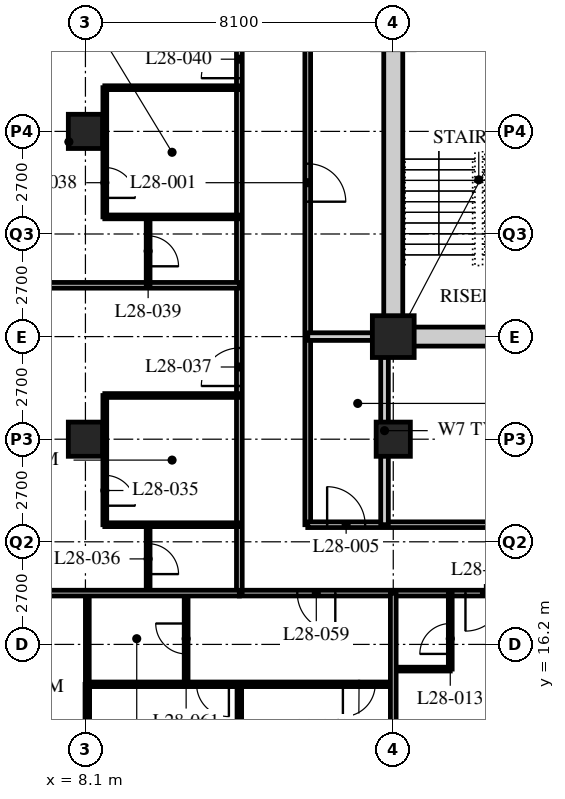
"""IFC4 building model, lengths in metres.
Left out: names, types, materials, properties, quantities, classifications, styles, units other than length and angle.
Written with IfcOpenShell. Run it as: python <this file> out.ifc"""

import sys

from ifc_helpers import new_model, si_unit, direction, frame, frame_2d, origin, origin_2d, place, context, subcontext, project, spatial, rectangle, hollow_rectangle, extrude, element, fill, save


model = new_model("IFC4")
c1 = context("Model", 3, precision=1e-05, world=origin(), true_north=direction((0.0, 1.0)))
c2 = subcontext(c1, "Body", "Model", "MODEL_VIEW")
j1 = project(units=[si_unit("LENGTHUNIT", "METRE"), si_unit("PLANEANGLEUNIT", "RADIAN")], contexts=[c1])
p1 = place(None, origin())
s1 = spatial("IfcSite", under=j1, at=p1, CompositionType="ELEMENT")
p2 = place(p1, origin())
s2 = spatial("IfcBuilding", under=s1, at=p2, CompositionType="ELEMENT")
p3 = place(p2, frame((0.0, 0.0, 113.6)))
s3 = spatial("IfcBuildingStorey", under=s2, at=p3, CompositionType="ELEMENT", Elevation=113.6)
for number, where, z_axis, x_axis in (
    (1, (8.1, 21.6, 0.0), (0.0, 0.0, 1.0), (1.0, 0.0, 0.0)),
    (2, (8.1, 29.7, 0.0), (0.0, 0.0, 1.0), (1.0, 0.0, 0.0)),
    (3, (16.2, 21.6, 0.0), (0.0, 0.0, 1.0), (1.0, 0.0, 0.0)),
):
    element("IfcColumn", number, at=place(p3, frame(where, z_axis=z_axis, x_axis=x_axis)), inside=s3, PredefinedType="COLUMN", context=c2, shape_type="SweptSolid", body=[
        extrude(hollow_rectangle(XDim=0.9, YDim=0.9, WallThickness=0.09, at=origin_2d()), origin(), (0.0, 0.0, 1.0), 3.4),
    ])
p4 = place(p3, frame((16.2, 24.3, 0.0), z_axis=(0.0, 0.0, 1.0), x_axis=(1.0, 0.0, 0.0)))
e4 = element("IfcColumn", 4, at=p4, inside=s3, PredefinedType="COLUMN", context=c2, shape_type="SweptSolid", body=[
    extrude(hollow_rectangle(XDim=1.1, YDim=1.1, WallThickness=0.1, at=origin_2d()), origin(), (0.0, 0.0, 1.0), 3.4),
])
p5 = place(p3, frame((12.15, 17.55, 0.0), z_axis=(0.0, 0.0, 1.0), x_axis=(1.0, 0.0, 0.0)))
e5 = element("IfcWall", 5, at=p5, inside=s3, PredefinedType="PARTITIONING", context=c2, shape_type="SweptSolid", body=[
    extrude(rectangle(XDim=32.4, YDim=0.15, at=frame_2d((16.2, 0.0))), origin(), (0.0, 0.0, 1.0), 3.19),
])
p6 = place(p5, frame((5.95, 0.0, 0.0)))
e6 = element("IfcOpeningElement", 6, at=p6, cuts=e5, PredefinedType="OPENING", context=c2, shape_type="SweptSolid", body=[
    extrude(rectangle(XDim=1.0, YDim=2.1, at=frame_2d((0.5, 1.05))), frame((0.0, 0.085, 0.0), z_axis=(0.0, -1.0, 0.0), x_axis=(1.0, 0.0, 0.0)), (0.0, 0.0, 1.0), 0.17),
])
p7 = place(p5, frame((17.725, 0.0, 0.0)))
e7 = element("IfcOpeningElement", 7, at=p7, cuts=e5, PredefinedType="OPENING", context=c2, shape_type="SweptSolid", body=[
    extrude(rectangle(XDim=1.0, YDim=2.1, at=frame_2d((0.5, 1.05))), frame((0.0, 0.085, 0.0), z_axis=(0.0, -1.0, 0.0), x_axis=(1.0, 0.0, 0.0)), (0.0, 0.0, 1.0), 0.17),
])
p8 = place(p5, frame((26.75, 0.0, 0.0)))
e8 = element("IfcOpeningElement", 8, at=p8, cuts=e5, PredefinedType="OPENING", context=c2, shape_type="SweptSolid", body=[
    extrude(rectangle(XDim=1.0, YDim=2.1, at=frame_2d((0.5, 1.05))), frame((0.0, 0.085, 0.0), z_axis=(0.0, -1.0, 0.0), x_axis=(1.0, 0.0, 0.0)), (0.0, 0.0, 1.0), 0.17),
])
p9 = place(p5, frame((1.525, 0.0, 0.0)))
e9 = element("IfcOpeningElement", 9, at=p9, cuts=e5, PredefinedType="OPENING", context=c2, shape_type="SweptSolid", body=[
    extrude(rectangle(XDim=1.0, YDim=2.1, at=frame_2d((0.5, 1.05))), frame((0.0, 0.085, 0.0), z_axis=(0.0, -1.0, 0.0), x_axis=(1.0, 0.0, 0.0)), (0.0, 0.0, 1.0), 0.17),
])
p10 = place(p5, frame((29.875, 0.0, 0.0)))
e10 = element("IfcOpeningElement", 10, at=p10, cuts=e5, PredefinedType="OPENING", context=c2, shape_type="SweptSolid", body=[
    extrude(rectangle(XDim=1.0, YDim=2.1, at=frame_2d((0.5, 1.05))), frame((0.0, 0.085, 0.0), z_axis=(0.0, -1.0, 0.0), x_axis=(1.0, 0.0, 0.0)), (0.0, 0.0, 1.0), 0.17),
])
p11 = place(p3, frame((12.15, 17.55, 0.0), z_axis=(0.0, 0.0, 1.0), x_axis=(0.0, 1.0, 0.0)))
e11 = element("IfcWall", 11, at=p11, inside=s3, PredefinedType="PARTITIONING", context=c2, shape_type="SweptSolid", body=[
    extrude(rectangle(XDim=28.35, YDim=0.15, at=frame_2d((14.175, 0.0))), origin(), (0.0, 0.0, 1.0), 3.19),
])
p12 = place(p11, frame((5.45, 0.0, 0.0)))
e12 = element("IfcOpeningElement", 12, at=p12, cuts=e11, PredefinedType="OPENING", context=c2, shape_type="SweptSolid", body=[
    extrude(rectangle(XDim=1.0, YDim=2.1, at=frame_2d((0.5, 1.05))), frame((0.0, 0.085, 0.0), z_axis=(0.0, -1.0, 0.0), x_axis=(1.0, 0.0, 0.0)), (0.0, 0.0, 1.0), 0.17),
])
p13 = place(p11, frame((13.55, 0.0, 0.0)))
e13 = element("IfcOpeningElement", 13, at=p13, cuts=e11, PredefinedType="OPENING", context=c2, shape_type="SweptSolid", body=[
    extrude(rectangle(XDim=1.0, YDim=2.1, at=frame_2d((0.5, 1.05))), frame((0.0, 0.085, 0.0), z_axis=(0.0, -1.0, 0.0), x_axis=(1.0, 0.0, 0.0)), (0.0, 0.0, 1.0), 0.17),
])
p14 = place(p11, frame((21.65, 0.0, 0.0)))
e14 = element("IfcOpeningElement", 14, at=p14, cuts=e11, PredefinedType="OPENING", context=c2, shape_type="SweptSolid", body=[
    extrude(rectangle(XDim=1.0, YDim=2.1, at=frame_2d((0.5, 1.05))), frame((0.0, 0.085, 0.0), z_axis=(0.0, -1.0, 0.0), x_axis=(1.0, 0.0, 0.0)), (0.0, 0.0, 1.0), 0.17),
])
p15 = place(p11, frame((26.75, 0.0, 0.0)))
e15 = element("IfcOpeningElement", 15, at=p15, cuts=e11, PredefinedType="OPENING", context=c2, shape_type="SweptSolid", body=[
    extrude(rectangle(XDim=1.0, YDim=2.1, at=frame_2d((0.5, 1.05))), frame((0.0, 0.085, 0.0), z_axis=(0.0, -1.0, 0.0), x_axis=(1.0, 0.0, 0.0)), (0.0, 0.0, 1.0), 0.17),
])
p16 = place(p3, frame((13.95, 44.1, 0.0), z_axis=(0.0, 0.0, 1.0), x_axis=(0.0, -1.0, 0.0)))
e16 = element("IfcWall", 16, at=p16, inside=s3, PredefinedType="PARTITIONING", context=c2, shape_type="SweptSolid", body=[
    extrude(rectangle(XDim=24.75, YDim=0.15, at=frame_2d((12.375, 0.0))), origin(), (0.0, 0.0, 1.0), 3.19),
])
p17 = place(p16, frame((15.25, 0.0, 0.0)))
e17 = element("IfcOpeningElement", 17, at=p17, cuts=e16, PredefinedType="OPENING", context=c2, shape_type="SweptSolid", body=[
    extrude(rectangle(XDim=1.0, YDim=2.1, at=frame_2d((0.5, 1.05))), frame((0.0, 0.085, 0.0), z_axis=(0.0, -1.0, 0.0), x_axis=(1.0, 0.0, 0.0)), (0.0, 0.0, 1.0), 0.17),
])
p18 = place(p16, frame((7.15, 0.0, 0.0)))
e18 = element("IfcOpeningElement", 18, at=p18, cuts=e16, PredefinedType="OPENING", context=c2, shape_type="SweptSolid", body=[
    extrude(rectangle(XDim=1.0, YDim=2.1, at=frame_2d((0.5, 1.05))), frame((0.0, 0.085, 0.0), z_axis=(0.0, -1.0, 0.0), x_axis=(1.0, 0.0, 0.0)), (0.0, 0.0, 1.0), 0.17),
])
p19 = place(p3, frame((13.95, 19.35, 0.0), z_axis=(0.0, 0.0, 1.0), x_axis=(1.0, 0.0, 0.0)))
e19 = element("IfcWall", 19, at=p19, inside=s3, PredefinedType="PARTITIONING", context=c2, shape_type="SweptSolid", body=[
    extrude(rectangle(XDim=13.19, YDim=0.15, at=frame_2d((6.595, 0.0))), origin(), (0.0, 0.0, 1.0), 3.19),
])
p20 = place(p19, frame((0.51, 0.0, 0.0)))
e20 = element("IfcOpeningElement", 20, at=p20, cuts=e19, PredefinedType="OPENING", context=c2, shape_type="SweptSolid", body=[
    extrude(rectangle(XDim=1.0, YDim=2.1, at=frame_2d((0.5, 1.05))), frame((0.0, 0.085, 0.0), z_axis=(0.0, -1.0, 0.0), x_axis=(1.0, 0.0, 0.0)), (0.0, 0.0, 1.0), 0.17),
])
p21 = place(p19, frame((7.11, 0.0, 0.0)))
e21 = element("IfcOpeningElement", 21, at=p21, cuts=e19, PredefinedType="OPENING", context=c2, shape_type="SweptSolid", body=[
    extrude(rectangle(XDim=1.0, YDim=2.1, at=frame_2d((0.5, 1.05))), frame((0.0, 0.085, 0.0), z_axis=(0.0, -1.0, 0.0), x_axis=(1.0, 0.0, 0.0)), (0.0, 0.0, 1.0), 0.17),
])
p22 = place(p3, frame((15.97, 19.35, 0.0), z_axis=(0.0, 0.0, 1.0), x_axis=(0.0, 1.0, 0.0)))
e22 = element("IfcWall", 22, at=p22, inside=s3, PredefinedType="SOLIDWALL", context=c2, shape_type="SweptSolid", body=[
    extrude(rectangle(XDim=4.95, YDim=0.2, at=frame_2d((2.475, 0.0))), origin(), (0.0, 0.0, 1.0), 2.49),
])
p23 = place(p3, frame((13.95, 24.3, 0.0), z_axis=(0.0, 0.0, 1.0), x_axis=(1.0, 0.0, 0.0)))
e23 = element("IfcWall", 23, at=p23, inside=s3, PredefinedType="SOLIDWALL", context=c2, shape_type="SweptSolid", body=[
    extrude(rectangle(XDim=2.25, YDim=0.2, at=frame_2d((1.125, 0.0))), origin(), (0.0, 0.0, 1.0), 3.19),
])
p24 = place(p3, frame((16.2, 15.55, 0.0), z_axis=(0.0, 0.0, 1.0), x_axis=(1.0, 0.0, 0.0)))
e24 = element("IfcWall", 24, at=p24, inside=s3, PredefinedType="PARTITIONING", context=c2, shape_type="SweptSolid", body=[
    extrude(rectangle(XDim=1.5, YDim=0.1, at=frame_2d((0.75, 0.0))), origin(), (0.0, 0.0, 1.0), 3.19),
])
p25 = place(p3, frame((17.7, 17.55, 0.0), z_axis=(0.0, 0.0, 1.0), x_axis=(0.0, -1.0, 0.0)))
e25 = element("IfcWall", 25, at=p25, inside=s3, PredefinedType="PARTITIONING", context=c2, shape_type="SweptSolid", body=[
    extrude(rectangle(XDim=2.0, YDim=0.1, at=frame_2d((1.0, 0.0))), origin(), (0.0, 0.0, 1.0), 3.19),
])
p26 = place(p25, frame((0.8, 0.0, 0.0)))
e26 = element("IfcOpeningElement", 26, at=p26, cuts=e25, PredefinedType="OPENING", context=c2, shape_type="SweptSolid", body=[
    extrude(rectangle(XDim=0.8, YDim=2.1, at=frame_2d((0.4, 1.05))), frame((0.0, 0.06, 0.0), z_axis=(0.0, -1.0, 0.0), x_axis=(1.0, 0.0, 0.0)), (0.0, 0.0, 1.0), 0.12),
])
p27 = place(p3, frame((8.61, 19.35, 0.0), z_axis=(0.0, 0.0, 1.0), x_axis=(0.0, 1.0, 0.0)))
e27 = element("IfcWall", 27, at=p27, inside=s3, PredefinedType="PARTITIONING", context=c2, shape_type="SweptSolid", body=[
    extrude(rectangle(XDim=3.4, YDim=0.1, at=frame_2d((1.7, 0.0))), origin(), (0.0, 0.0, 1.0), 3.19),
])
p28 = place(p27, frame((0.5, 0.0, 0.0)))
e28 = element("IfcOpeningElement", 28, at=p28, cuts=e27, PredefinedType="OPENING", context=c2, shape_type="SweptSolid", body=[
    extrude(rectangle(XDim=0.8, YDim=2.1, at=frame_2d((0.4, 1.05))), frame((0.0, 0.06, 0.0), z_axis=(0.0, -1.0, 0.0), x_axis=(1.0, 0.0, 0.0)), (0.0, 0.0, 1.0), 0.12),
])
p29 = place(p3, frame((9.75, 17.55, 0.0), z_axis=(0.0, 0.0, 1.0), x_axis=(0.0, 1.0, 0.0)))
e29 = element("IfcWall", 29, at=p29, inside=s3, PredefinedType="PARTITIONING", context=c2, shape_type="SweptSolid", body=[
    extrude(rectangle(XDim=1.8, YDim=0.1, at=frame_2d((0.9, 0.0))), origin(), (0.0, 0.0, 1.0), 3.19),
])
p30 = place(p29, frame((0.5, 0.0, 0.0)))
e30 = element("IfcOpeningElement", 30, at=p30, cuts=e29, PredefinedType="OPENING", context=c2, shape_type="SweptSolid", body=[
    extrude(rectangle(XDim=0.8, YDim=2.1, at=frame_2d((0.4, 1.05))), frame((0.0, 0.06, 0.0), z_axis=(0.0, -1.0, 0.0), x_axis=(1.0, 0.0, 0.0)), (0.0, 0.0, 1.0), 0.12),
])
for number, where, z_axis, x_axis in (
    (31, (12.15, 19.35, 0.0), (0.0, 0.0, 1.0), (-1.0, 0.0, 0.0)),
    (32, (12.15, 22.75, 0.0), (0.0, 0.0, 1.0), (-1.0, 0.0, 0.0)),
):
    element("IfcWall", number, at=place(p3, frame(where, z_axis=z_axis, x_axis=x_axis)), inside=s3, PredefinedType="PARTITIONING", context=c2, shape_type="SweptSolid", body=[
        extrude(rectangle(XDim=3.54, YDim=0.1, at=frame_2d((1.77, 0.0))), origin(), (0.0, 0.0, 1.0), 3.19),
    ])
p31 = place(p3, frame((12.15, 25.65, 0.0), z_axis=(0.0, 0.0, 1.0), x_axis=(-1.0, 0.0, 0.0)))
e33 = element("IfcWall", 33, at=p31, inside=s3, PredefinedType="PARTITIONING", context=c2, shape_type="SweptSolid", body=[
    extrude(rectangle(XDim=11.85, YDim=0.15, at=frame_2d((5.925, 0.0))), origin(), (0.0, 0.0, 1.0), 3.19),
])
p32 = place(p3, frame((8.61, 27.45, 0.0), z_axis=(0.0, 0.0, 1.0), x_axis=(0.0, 1.0, 0.0)))
e34 = element("IfcWall", 34, at=p32, inside=s3, PredefinedType="PARTITIONING", context=c2, shape_type="SweptSolid", body=[
    extrude(rectangle(XDim=3.4, YDim=0.1, at=frame_2d((1.7, 0.0))), origin(), (0.0, 0.0, 1.0), 3.19),
])
p33 = place(p32, frame((0.5, 0.0, 0.0)))
e35 = element("IfcOpeningElement", 35, at=p33, cuts=e34, PredefinedType="OPENING", context=c2, shape_type="SweptSolid", body=[
    extrude(rectangle(XDim=0.8, YDim=2.1, at=frame_2d((0.4, 1.05))), frame((0.0, 0.06, 0.0), z_axis=(0.0, -1.0, 0.0), x_axis=(1.0, 0.0, 0.0)), (0.0, 0.0, 1.0), 0.12),
])
p34 = place(p3, frame((9.75, 25.65, 0.0), z_axis=(0.0, 0.0, 1.0), x_axis=(0.0, 1.0, 0.0)))
e36 = element("IfcWall", 36, at=p34, inside=s3, PredefinedType="PARTITIONING", context=c2, shape_type="SweptSolid", body=[
    extrude(rectangle(XDim=1.8, YDim=0.1, at=frame_2d((0.9, 0.0))), origin(), (0.0, 0.0, 1.0), 3.19),
])
p35 = place(p34, frame((0.5, 0.0, 0.0)))
e37 = element("IfcOpeningElement", 37, at=p35, cuts=e36, PredefinedType="OPENING", context=c2, shape_type="SweptSolid", body=[
    extrude(rectangle(XDim=0.8, YDim=2.1, at=frame_2d((0.4, 1.05))), frame((0.0, 0.06, 0.0), z_axis=(0.0, -1.0, 0.0), x_axis=(1.0, 0.0, 0.0)), (0.0, 0.0, 1.0), 0.12),
])
for number, where, z_axis, x_axis in (
    (38, (12.15, 27.45, 0.0), (0.0, 0.0, 1.0), (-1.0, 0.0, 0.0)),
    (39, (12.15, 30.85, 0.0), (0.0, 0.0, 1.0), (-1.0, 0.0, 0.0)),
):
    element("IfcWall", number, at=place(p3, frame(where, z_axis=z_axis, x_axis=x_axis)), inside=s3, PredefinedType="PARTITIONING", context=c2, shape_type="SweptSolid", body=[
        extrude(rectangle(XDim=3.54, YDim=0.1, at=frame_2d((1.77, 0.0))), origin(), (0.0, 0.0, 1.0), 3.19),
    ])
p36 = place(p3, frame((10.75, 17.55, 0.0), z_axis=(0.0, 0.0, 1.0), x_axis=(0.0, -1.0, 0.0)))
e40 = element("IfcWall", 40, at=p36, inside=s3, PredefinedType="PARTITIONING", context=c2, shape_type="SweptSolid", body=[
    extrude(rectangle(XDim=2.4, YDim=0.1, at=frame_2d((1.2, 0.0))), origin(), (0.0, 0.0, 1.0), 3.19),
])
p37 = place(p36, frame((0.8, 0.0, 0.0)))
e41 = element("IfcOpeningElement", 41, at=p37, cuts=e40, PredefinedType="OPENING", context=c2, shape_type="SweptSolid", body=[
    extrude(rectangle(XDim=0.8, YDim=2.1, at=frame_2d((0.4, 1.05))), frame((0.0, 0.06, 0.0), z_axis=(0.0, -1.0, 0.0), x_axis=(1.0, 0.0, 0.0)), (0.0, 0.0, 1.0), 0.12),
])
p38 = place(p3, frame((8.15, 17.55, 0.0), z_axis=(0.0, 0.0, 1.0), x_axis=(0.0, -1.0, 0.0)))
e42 = element("IfcWall", 42, at=p38, inside=s3, PredefinedType="PARTITIONING", context=c2, shape_type="SweptSolid", body=[
    extrude(rectangle(XDim=2.4, YDim=0.1, at=frame_2d((1.2, 0.0))), origin(), (0.0, 0.0, 1.0), 2.578),
])
p39 = place(p3, frame((8.15, 15.15, 0.0), z_axis=(0.0, 0.0, 1.0), x_axis=(1.0, 0.0, 0.0)))
e43 = element("IfcWall", 43, at=p39, inside=s3, PredefinedType="PARTITIONING", context=c2, shape_type="SweptSolid", body=[
    extrude(rectangle(XDim=8.05, YDim=0.12, at=frame_2d((4.025, 0.0))), origin(), (0.0, 0.0, 1.0), 3.19),
])
p40 = place(p39, frame((6.725, 0.0, 0.0)))
e44 = element("IfcOpeningElement", 44, at=p40, cuts=e43, PredefinedType="OPENING", context=c2, shape_type="SweptSolid", body=[
    extrude(rectangle(XDim=0.85, YDim=2.1, at=frame_2d((0.425, 1.05))), frame((0.0, 0.07, 0.0), z_axis=(0.0, -1.0, 0.0), x_axis=(1.0, 0.0, 0.0)), (0.0, 0.0, 1.0), 0.14),
])
p41 = place(p39, frame((2.875, 0.0, 0.0)))
e45 = element("IfcOpeningElement", 45, at=p41, cuts=e43, PredefinedType="OPENING", context=c2, shape_type="SweptSolid", body=[
    extrude(rectangle(XDim=0.85, YDim=2.1, at=frame_2d((0.425, 1.05))), frame((0.0, 0.07, 0.0), z_axis=(0.0, -1.0, 0.0), x_axis=(1.0, 0.0, 0.0)), (0.0, 0.0, 1.0), 0.14),
])
p42 = place(p3, frame((12.15, 15.15, 0.0), z_axis=(0.0, 0.0, 1.0), x_axis=(0.0, -1.0, 0.0)))
e46 = element("IfcWall", 46, at=p42, inside=s3, PredefinedType="PARTITIONING", context=c2, shape_type="SweptSolid", body=[
    extrude(rectangle(XDim=9.45, YDim=0.12, at=frame_2d((4.725, 0.0))), origin(), (0.0, 0.0, 1.0), 3.19),
])
p43 = place(p3, frame((0.3, 17.55, 0.0), z_axis=(0.0, 0.0, 1.0), x_axis=(1.0, 0.0, 0.0)))
e47 = element("IfcWall", 47, at=p43, inside=s3, PredefinedType="PARTITIONING", context=c2, shape_type="SweptSolid", body=[
    extrude(rectangle(XDim=11.85, YDim=0.15, at=frame_2d((5.925, 0.0))), origin(), (0.0, 0.0, 1.0), 3.19),
])
p44 = place(p3, frame((16.2, 17.55, 0.0), z_axis=(0.0, 0.0, 1.0), x_axis=(0.0, -1.0, 0.0)))
e48 = element("IfcWall", 48, at=p44, inside=s3, PredefinedType="PARTITIONING", context=c2, shape_type="SweptSolid", body=[
    extrude(rectangle(XDim=11.85, YDim=0.15, at=frame_2d((5.925, 0.0))), origin(), (0.0, 0.0, 1.0), 2.578),
])
p45 = place(p3, frame((8.15, 15.15, 0.0), z_axis=(0.0, 0.0, 1.0), x_axis=(0.0, -1.0, 0.0)))
e49 = element("IfcWall", 49, at=p45, inside=s3, PredefinedType="PARTITIONING", context=c2, shape_type="SweptSolid", body=[
    extrude(rectangle(XDim=1.2, YDim=0.12, at=frame_2d((0.6, 0.0))), origin(), (0.0, 0.0, 1.0), 2.578),
])
p46 = place(p3, frame((15.95, 24.3, 0.0), z_axis=(0.0, 0.0, 1.0), x_axis=(1.0, 0.0, 0.0)))
e50 = element("IfcWall", 50, at=p46, inside=s3, PredefinedType="SOLIDWALL", context=c2, shape_type="SweptSolid", body=[
    extrude(rectangle(XDim=24.8, YDim=0.5, at=frame_2d((12.4, 0.0))), origin(), (0.0, 0.0, 1.0), 2.54),
])
p47 = place(p46, frame((11.5, 0.0, 0.0)))
e51 = element("IfcOpeningElement", 51, at=p47, cuts=e50, PredefinedType="OPENING", context=c2, shape_type="SweptSolid", body=[
    extrude(rectangle(XDim=1.8, YDim=2.4, at=frame_2d((0.9, 1.2))), frame((0.0, 0.26, 0.0), z_axis=(0.0, -1.0, 0.0), x_axis=(1.0, 0.0, 0.0)), (0.0, 0.0, 1.0), 0.52),
])
p48 = place(p3, frame((16.2, 24.55, 0.0), z_axis=(0.0, 0.0, 1.0), x_axis=(0.0, 1.0, 0.0)))
e52 = element("IfcWall", 52, at=p48, inside=s3, PredefinedType="SOLIDWALL", context=c2, shape_type="SweptSolid", body=[
    extrude(rectangle(XDim=15.7, YDim=0.5, at=frame_2d((7.85, 0.0))), origin(), (0.0, 0.0, 1.0), 2.578),
])
p49 = place(p17, origin())
e53 = element("IfcDoor", 53, at=p49, inside=s3, OperationType="SINGLE_SWING_RIGHT", PredefinedType="DOOR", context=c2, shape_type="SweptSolid", body=[
    extrude(rectangle(XDim=1.0, YDim=2.1, at=frame_2d((0.5, 1.05))), frame((0.0, 0.025, 0.0), z_axis=(0.0, -1.0, 0.0), x_axis=(1.0, 0.0, 0.0)), (0.0, 0.0, 1.0), 0.05),
])
fill(e17, e53)
p50 = place(p20, origin())
e54 = element("IfcDoor", 54, at=p50, inside=s3, OperationType="SINGLE_SWING_LEFT", PredefinedType="DOOR", context=c2, shape_type="SweptSolid", body=[
    extrude(rectangle(XDim=1.0, YDim=2.1, at=frame_2d((0.5, 1.05))), frame((0.0, 0.025, 0.0), z_axis=(0.0, -1.0, 0.0), x_axis=(1.0, 0.0, 0.0)), (0.0, 0.0, 1.0), 0.05),
])
fill(e20, e54)
p51 = place(p26, origin())
e55 = element("IfcDoor", 55, at=p51, inside=s3, OperationType="SINGLE_SWING_LEFT", PredefinedType="DOOR", context=c2, shape_type="SweptSolid", body=[
    extrude(rectangle(XDim=0.8, YDim=2.1, at=frame_2d((0.4, 1.05))), frame((0.0, 0.025, 0.0), z_axis=(0.0, -1.0, 0.0), x_axis=(1.0, 0.0, 0.0)), (0.0, 0.0, 1.0), 0.05),
])
fill(e26, e55)
p52 = place(p6, origin())
e56 = element("IfcDoor", 56, at=p52, inside=s3, OperationType="SINGLE_SWING_RIGHT", PredefinedType="DOOR", context=c2, shape_type="SweptSolid", body=[
    extrude(rectangle(XDim=1.0, YDim=2.1, at=frame_2d((0.5, 1.05))), frame((0.0, 0.025, 0.0), z_axis=(0.0, -1.0, 0.0), x_axis=(1.0, 0.0, 0.0)), (0.0, 0.0, 1.0), 0.05),
])
fill(e6, e56)
p53 = place(p28, origin())
e57 = element("IfcDoor", 57, at=p53, inside=s3, OperationType="SINGLE_SWING_RIGHT", PredefinedType="DOOR", context=c2, shape_type="SweptSolid", body=[
    extrude(rectangle(XDim=0.8, YDim=2.1, at=frame_2d((0.4, 1.05))), frame((0.0, 0.025, 0.0), z_axis=(0.0, -1.0, 0.0), x_axis=(1.0, 0.0, 0.0)), (0.0, 0.0, 1.0), 0.05),
])
fill(e28, e57)
p54 = place(p30, origin())
e58 = element("IfcDoor", 58, at=p54, inside=s3, OperationType="SINGLE_SWING_RIGHT", PredefinedType="DOOR", context=c2, shape_type="SweptSolid", body=[
    extrude(rectangle(XDim=0.8, YDim=2.1, at=frame_2d((0.4, 1.05))), frame((0.0, 0.025, 0.0), z_axis=(0.0, -1.0, 0.0), x_axis=(1.0, 0.0, 0.0)), (0.0, 0.0, 1.0), 0.05),
])
fill(e30, e58)
p55 = place(p12, origin())
e59 = element("IfcDoor", 59, at=p55, inside=s3, OperationType="SINGLE_SWING_LEFT", PredefinedType="DOOR", context=c2, shape_type="SweptSolid", body=[
    extrude(rectangle(XDim=1.0, YDim=2.1, at=frame_2d((0.5, 1.05))), frame((0.0, 0.025, 0.0), z_axis=(0.0, -1.0, 0.0), x_axis=(1.0, 0.0, 0.0)), (0.0, 0.0, 1.0), 0.05),
])
fill(e12, e59)
p56 = place(p33, origin())
e60 = element("IfcDoor", 60, at=p56, inside=s3, OperationType="SINGLE_SWING_RIGHT", PredefinedType="DOOR", context=c2, shape_type="SweptSolid", body=[
    extrude(rectangle(XDim=0.8, YDim=2.1, at=frame_2d((0.4, 1.05))), frame((0.0, 0.025, 0.0), z_axis=(0.0, -1.0, 0.0), x_axis=(1.0, 0.0, 0.0)), (0.0, 0.0, 1.0), 0.05),
])
fill(e35, e60)
p57 = place(p35, origin())
e61 = element("IfcDoor", 61, at=p57, inside=s3, OperationType="SINGLE_SWING_RIGHT", PredefinedType="DOOR", context=c2, shape_type="SweptSolid", body=[
    extrude(rectangle(XDim=0.8, YDim=2.1, at=frame_2d((0.4, 1.05))), frame((0.0, 0.025, 0.0), z_axis=(0.0, -1.0, 0.0), x_axis=(1.0, 0.0, 0.0)), (0.0, 0.0, 1.0), 0.05),
])
fill(e37, e61)
p58 = place(p13, origin())
e62 = element("IfcDoor", 62, at=p58, inside=s3, OperationType="SINGLE_SWING_LEFT", PredefinedType="DOOR", context=c2, shape_type="SweptSolid", body=[
    extrude(rectangle(XDim=1.0, YDim=2.1, at=frame_2d((0.5, 1.05))), frame((0.0, 0.025, 0.0), z_axis=(0.0, -1.0, 0.0), x_axis=(1.0, 0.0, 0.0)), (0.0, 0.0, 1.0), 0.05),
])
fill(e13, e62)
p59 = place(p9, origin())
e63 = element("IfcDoor", 63, at=p59, inside=s3, OperationType="SINGLE_SWING_LEFT", PredefinedType="DOOR", context=c2, shape_type="SweptSolid", body=[
    extrude(rectangle(XDim=1.0, YDim=2.1, at=frame_2d((0.5, 1.05))), frame((0.0, 0.025, 0.0), z_axis=(0.0, -1.0, 0.0), x_axis=(1.0, 0.0, 0.0)), (0.0, 0.0, 1.0), 0.05),
])
fill(e9, e63)
p60 = place(p40, origin())
e64 = element("IfcDoor", 64, at=p60, inside=s3, OperationType="SINGLE_SWING_RIGHT", PredefinedType="DOOR", context=c2, shape_type="SweptSolid", body=[
    extrude(rectangle(XDim=0.85, YDim=2.1, at=frame_2d((0.425, 1.05))), frame((0.0, 0.025, 0.0), z_axis=(0.0, -1.0, 0.0), x_axis=(1.0, 0.0, 0.0)), (0.0, 0.0, 1.0), 0.05),
])
fill(e44, e64)
p61 = place(p37, origin())
e65 = element("IfcDoor", 65, at=p61, inside=s3, OperationType="SINGLE_SWING_RIGHT", PredefinedType="DOOR", context=c2, shape_type="SweptSolid", body=[
    extrude(rectangle(XDim=0.8, YDim=2.1, at=frame_2d((0.4, 1.05))), frame((0.0, 0.025, 0.0), z_axis=(0.0, -1.0, 0.0), x_axis=(1.0, 0.0, 0.0)), (0.0, 0.0, 1.0), 0.05),
])
fill(e41, e65)
p62 = place(p41, origin())
e66 = element("IfcDoor", 66, at=p62, inside=s3, OperationType="SINGLE_SWING_LEFT", PredefinedType="DOOR", context=c2, shape_type="SweptSolid", body=[
    extrude(rectangle(XDim=0.85, YDim=2.1, at=frame_2d((0.425, 1.05))), frame((0.0, 0.025, 0.0), z_axis=(0.0, -1.0, 0.0), x_axis=(1.0, 0.0, 0.0)), (0.0, 0.0, 1.0), 0.05),
])
fill(e45, e66)
save(model, sys.argv[1])
